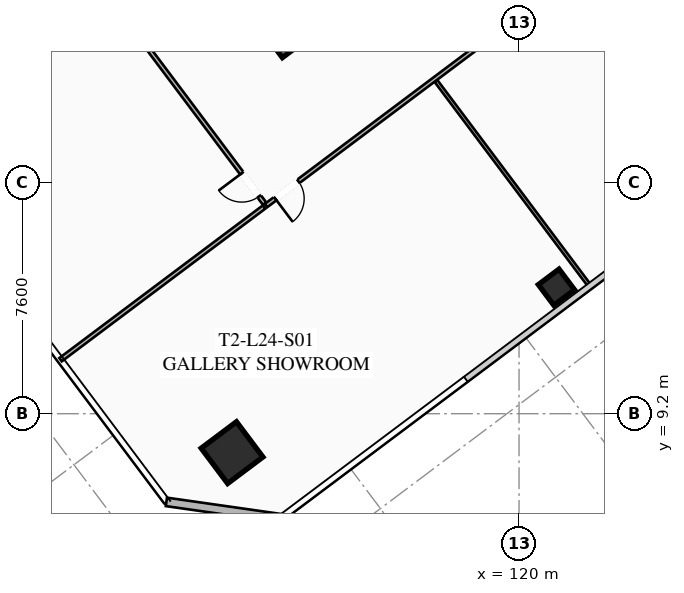
"""IFC4 building model, lengths in metres.
Left out: names, types, materials, properties, quantities, classifications, styles, units other than length and angle.
Written with IfcOpenShell. Run it as: python <this file> out.ifc"""

import sys

from ifc_helpers import new_model, si_unit, direction, frame, frame_2d, origin, origin_2d, place, context, subcontext, project, spatial, rectangle, hollow_rectangle, extrude, element, fill, save


model = new_model("IFC4")
c1 = context("Model", 3, precision=1e-05, world=origin(), true_north=direction((0.0, 1.0)))
c2 = subcontext(c1, "Body", "Model", "MODEL_VIEW")
j1 = project(units=[si_unit("LENGTHUNIT", "METRE"), si_unit("PLANEANGLEUNIT", "RADIAN")], contexts=[c1])
p1 = place(None, origin())
s1 = spatial("IfcSite", under=j1, at=p1, CompositionType="ELEMENT")
p2 = place(p1, origin())
s2 = spatial("IfcBuilding", under=s1, at=p2, CompositionType="ELEMENT")
p3 = place(p2, frame((0.0, 0.0, 92.05)))
s3 = spatial("IfcBuildingStorey", under=s2, at=p3, CompositionType="ELEMENT", Elevation=92.05)
p4 = place(p3, frame((112.476, 21.107, 0.0), z_axis=(0.0, 0.0, 1.0), x_axis=(-0.600005007985, 0.799996243986, 0.0)))
e1 = element("IfcWall", 1, at=p4, inside=s3, PredefinedType="SHEAR", context=c2, shape_type="SweptSolid", body=[
    extrude(rectangle(XDim=15.6, YDim=0.65, at=frame_2d((7.8, 0.0))), origin(), (0.0, 0.0, 1.0), 3.55),
])
p5 = place(p3, frame((110.56, 7.92, 0.0), z_axis=(0.0, 0.0, 1.0), x_axis=(0.799999996291, 0.600000004945, 0.0)))
e2 = element("IfcColumn", 2, at=p5, inside=s3, PredefinedType="COLUMN", context=c2, shape_type="SweptSolid", body=[
    extrude(hollow_rectangle(XDim=1.45, YDim=1.45, WallThickness=0.055, at=origin_2d()), origin(), (0.0, 0.0, 1.0), 3.35),
])
p6 = place(p3, frame((121.23, 13.36, 0.0), z_axis=(0.0, 0.0, 1.0), x_axis=(0.799999996291, 0.600000004945, 0.0)))
e3 = element("IfcColumn", 3, at=p6, inside=s3, PredefinedType="COLUMN", context=c2, shape_type="SweptSolid", body=[
    extrude(hollow_rectangle(XDim=0.85, YDim=0.85, WallThickness=0.035, at=origin_2d()), origin(), (0.0, 0.0, 1.0), 3.35),
])
p7 = place(p3, frame((112.18, 5.76, 0.0), z_axis=(0.0, 0.0, 1.0), x_axis=(-0.989948214866, 0.141430307517, 0.0)))
e4 = element("IfcWall", 4, at=p7, inside=s3, PredefinedType="SOLIDWALL", context=c2, shape_type="SweptSolid", body=[
    extrude(rectangle(XDim=3.818, YDim=0.28, at=frame_2d((1.909, 0.0))), origin(), (0.0, 0.0, 1.0), 3.35),
])
p8 = place(p3, frame((134.462, 33.134, 0.0), z_axis=(0.0, 0.0, 1.0), x_axis=(-0.799996913945, -0.600004114717, 0.0)))
e5 = element("IfcWall", 5, at=p8, inside=s3, PredefinedType="PARTITIONING", context=c2, shape_type="SweptSolid", body=[
    extrude(rectangle(XDim=28.48, YDim=0.135, at=frame_2d((14.24, 0.0))), origin(), (0.0, 0.0, 1.0), 2.703),
])
p9 = place(p8, frame((27.15, 0.0, 0.0)))
e6 = element("IfcOpeningElement", 6, at=p9, cuts=e5, PredefinedType="OPENING", context=c2, shape_type="SweptSolid", body=[
    extrude(rectangle(XDim=0.95, YDim=2.05, at=frame_2d((0.475, 1.025))), frame((0.0, 0.077, 0.0), z_axis=(0.0, -1.0, 0.0), x_axis=(1.0, 0.0, 0.0)), (0.0, 0.0, 1.0), 0.155),
])
p10 = place(p8, frame((0.38, 0.0, 0.0)))
e7 = element("IfcOpeningElement", 7, at=p10, cuts=e5, PredefinedType="OPENING", context=c2, shape_type="SweptSolid", body=[
    extrude(rectangle(XDim=0.95, YDim=2.05, at=frame_2d((0.475, 1.025))), frame((0.0, 0.077, 0.0), z_axis=(0.0, -1.0, 0.0), x_axis=(1.0, 0.0, 0.0)), (0.0, 0.0, 1.0), 0.155),
])
p11 = place(p3, frame((122.328, 13.396, 0.0), z_axis=(0.0, 0.0, 1.0), x_axis=(-0.59999536615, 0.800003475366, 0.0)))
e8 = element("IfcWall", 8, at=p11, inside=s3, PredefinedType="PARTITIONING", context=c2, shape_type="SweptSolid", body=[
    extrude(rectangle(XDim=8.43, YDim=0.11, at=frame_2d((4.215, 0.0))), origin(), (0.0, 0.0, 1.0), 2.703),
])
p12 = place(p3, frame((111.63, 16.11, 0.0), z_axis=(0.0, 0.0, 1.0), x_axis=(-0.599996466511, 0.800002650104, 0.0)))
e9 = element("IfcWall", 9, at=p12, inside=s3, PredefinedType="PARTITIONING", context=c2, shape_type="SweptSolid", body=[
    extrude(rectangle(XDim=22.11, YDim=0.135, at=frame_2d((11.055, 0.0))), origin(), (0.0, 0.0, 1.0), 2.703),
])
p13 = place(p12, frame((0.3, 0.0, 0.0)))
e10 = element("IfcOpeningElement", 10, at=p13, cuts=e9, PredefinedType="OPENING", context=c2, shape_type="SweptSolid", body=[
    extrude(rectangle(XDim=0.95, YDim=2.05, at=frame_2d((0.475, 1.025))), frame((0.0, 0.077, 0.0), z_axis=(0.0, -1.0, 0.0), x_axis=(1.0, 0.0, 0.0)), (0.0, 0.0, 1.0), 0.155),
])
p14 = place(p3, frame((104.918, 10.976, 0.0), z_axis=(0.0, 0.0, 1.0), x_axis=(0.800003500202, 0.599995333035, 0.0)))
e11 = element("IfcWall", 11, at=p14, inside=s3, PredefinedType="PARTITIONING", context=c2, shape_type="SweptSolid", body=[
    extrude(rectangle(XDim=8.37, YDim=0.135, at=frame_2d((4.185, 0.0))), origin(), (0.0, 0.0, 1.0), 2.703),
])
p15 = place(p9, origin())
e12 = element("IfcDoor", 12, at=p15, inside=s3, OperationType="SINGLE_SWING_RIGHT", PredefinedType="DOOR", context=c2, shape_type="SweptSolid", body=[
    extrude(rectangle(XDim=0.95, YDim=2.05, at=frame_2d((0.475, 1.025))), frame((0.0, 0.025, 0.0), z_axis=(0.0, -1.0, 0.0), x_axis=(1.0, 0.0, 0.0)), (0.0, 0.0, 1.0), 0.05),
])
fill(e6, e12)
p16 = place(p13, origin())
e13 = element("IfcDoor", 13, at=p16, inside=s3, OperationType="SINGLE_SWING_RIGHT", PredefinedType="DOOR", context=c2, shape_type="SweptSolid", body=[
    extrude(rectangle(XDim=0.95, YDim=2.05, at=frame_2d((0.475, 1.025))), frame((0.0, 0.025, 0.0), z_axis=(0.0, -1.0, 0.0), x_axis=(1.0, 0.0, 0.0)), (0.0, 0.0, 1.0), 0.05),
])
fill(e10, e13)
save(model, sys.argv[1])
